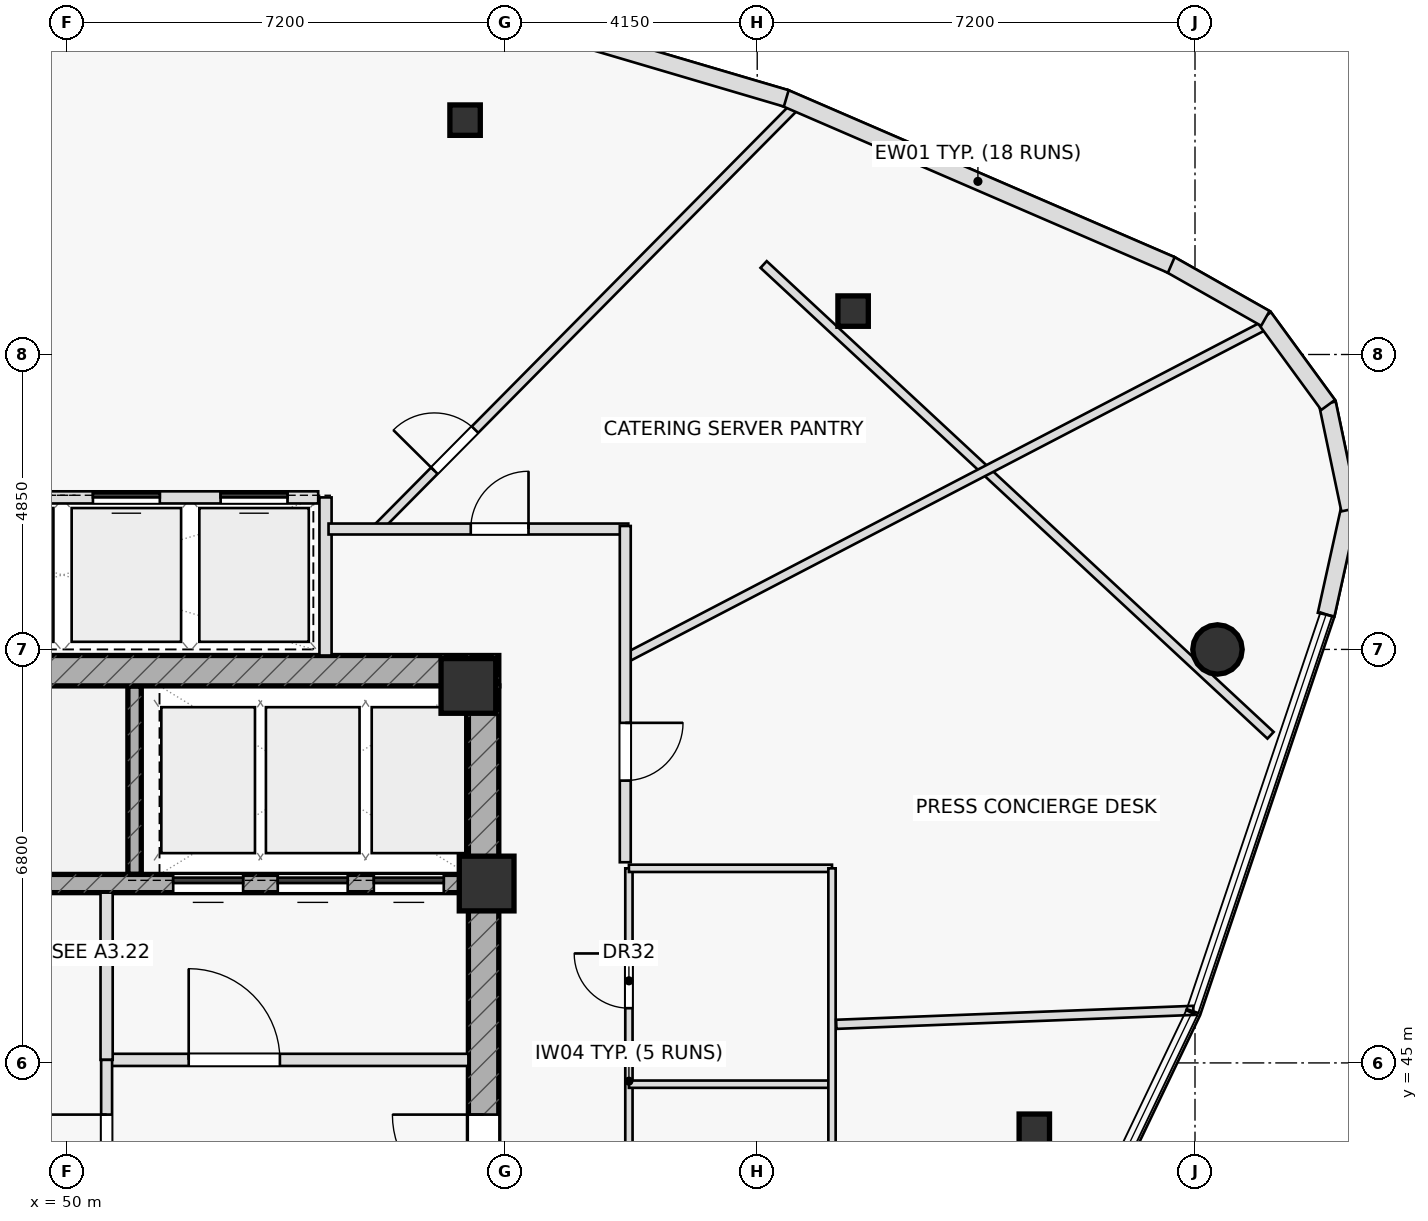
"""IFC4 building model, lengths in metres.
Left out: names, types, materials, properties, quantities, classifications, styles, units other than length and angle.
Written with IfcOpenShell. Run it as: python <this file> out.ifc"""

import sys

from ifc_helpers import new_model, si_unit, direction, frame, frame_2d, origin, origin_2d, place, context, subcontext, project, spatial, rectangle, hollow_rectangle, hollow_circle, extrude, element, fill, save


model = new_model("IFC4")
c1 = context("Model", 3, precision=1e-05, world=origin(), true_north=direction((0.0, 1.0)))
c2 = subcontext(c1, "Body", "Model", "MODEL_VIEW")
j1 = project(units=[si_unit("LENGTHUNIT", "METRE"), si_unit("PLANEANGLEUNIT", "RADIAN")], contexts=[c1])
p1 = place(None, origin())
s1 = spatial("IfcSite", under=j1, at=p1, CompositionType="ELEMENT")
p2 = place(p1, origin())
s2 = spatial("IfcBuilding", under=s1, at=p2, CompositionType="ELEMENT")
p3 = place(p2, frame((0.0, 0.0, 269.55)))
s3 = spatial("IfcBuildingStorey", under=s2, at=p3, CompositionType="ELEMENT", Elevation=269.55)
p4 = place(p3, frame((51.11, 48.1, 0.0), z_axis=(0.0, 0.0, 1.0), x_axis=(0.0, 1.0, 0.0)))
e1 = element("IfcWall", 1, at=p4, inside=s3, PredefinedType="SHEAR", context=c2, shape_type="SweptSolid", body=[
    extrude(rectangle(XDim=3.1, YDim=0.22, at=frame_2d((1.55, 0.0))), origin(), (0.0, 0.0, 1.0), 3.5),
])
p5 = place(p3, frame((42.9, 51.45, 0.0), z_axis=(0.0, 0.0, 1.0), x_axis=(1.0, 0.0, 0.0)))
e2 = element("IfcWall", 2, at=p5, inside=s3, PredefinedType="SHEAR", context=c2, shape_type="SweptSolid", body=[
    extrude(rectangle(XDim=14.2, YDim=0.5, at=frame_2d((7.1, 0.0))), origin(), (0.0, 0.0, 1.0), 3.5),
])
p6 = place(p5, frame((0.78, 0.0, 0.0)))
e3 = element("IfcOpeningElement", 3, at=p6, cuts=e2, PredefinedType="OPENING", context=c2, shape_type="SweptSolid", body=[
    extrude(rectangle(XDim=1.05, YDim=2.2, at=frame_2d((0.525, 1.1))), frame((0.0, 0.26, 0.0), z_axis=(0.0, -1.0, 0.0), x_axis=(1.0, 0.0, 0.0)), (0.0, 0.0, 1.0), 0.52),
])
p7 = place(p3, frame((56.85, 38.8, 0.0), z_axis=(0.0, 0.0, 1.0), x_axis=(0.0, 1.0, 0.0)))
e4 = element("IfcWall", 4, at=p7, inside=s3, PredefinedType="SHEAR", context=c2, shape_type="SweptSolid", body=[
    extrude(rectangle(XDim=12.4, YDim=0.5, at=frame_2d((6.2, 0.0))), origin(), (0.0, 0.0, 1.0), 3.5),
])
p8 = place(p7, frame((3.85, 0.0, 0.0)))
e5 = element("IfcOpeningElement", 5, at=p8, cuts=e4, PredefinedType="OPENING", context=c2, shape_type="SweptSolid", body=[
    extrude(rectangle(XDim=1.5, YDim=2.2, at=frame_2d((0.75, 1.1))), frame((0.0, 0.26, 0.0), z_axis=(0.0, -1.0, 0.0), x_axis=(1.0, 0.0, 0.0)), (0.0, 0.0, 1.0), 0.52),
])
p9 = place(p3, frame((43.4, 47.95, 0.0), z_axis=(0.0, 0.0, 1.0), x_axis=(1.0, 0.0, 0.0)))
e6 = element("IfcWall", 6, at=p9, inside=s3, PredefinedType="SHEAR", context=c2, shape_type="SweptSolid", body=[
    extrude(rectangle(XDim=13.2, YDim=0.3, at=frame_2d((6.6, 0.0))), origin(), (0.0, 0.0, 1.0), 3.5),
])
p10 = place(p9, frame((8.345, 0.0, 0.0)))
e7 = element("IfcOpeningElement", 7, at=p10, cuts=e6, PredefinedType="OPENING", context=c2, shape_type="SweptSolid", body=[
    extrude(rectangle(XDim=1.15, YDim=2.2, at=frame_2d((0.575, 1.1))), frame((0.0, 0.16, 0.0), z_axis=(0.0, -1.0, 0.0), x_axis=(1.0, 0.0, 0.0)), (0.0, 0.0, 1.0), 0.32),
])
p11 = place(p9, frame((10.065, 0.0, 0.0)))
e8 = element("IfcOpeningElement", 8, at=p11, cuts=e6, PredefinedType="OPENING", context=c2, shape_type="SweptSolid", body=[
    extrude(rectangle(XDim=1.15, YDim=2.2, at=frame_2d((0.575, 1.1))), frame((0.0, 0.16, 0.0), z_axis=(0.0, -1.0, 0.0), x_axis=(1.0, 0.0, 0.0)), (0.0, 0.0, 1.0), 0.32),
])
p12 = place(p9, frame((11.645, 0.0, 0.0)))
e9 = element("IfcOpeningElement", 9, at=p12, cuts=e6, PredefinedType="OPENING", context=c2, shape_type="SweptSolid", body=[
    extrude(rectangle(XDim=1.15, YDim=2.2, at=frame_2d((0.575, 1.1))), frame((0.0, 0.16, 0.0), z_axis=(0.0, -1.0, 0.0), x_axis=(1.0, 0.0, 0.0)), (0.0, 0.0, 1.0), 0.32),
])
for number, where, z_axis, x_axis in (
    (10, (56.9, 47.95, 0.0), (0.0, 0.0, 1.0), (1.0, 0.0, 0.0)),
    (11, (56.6, 51.2, 0.0), (0.0, 0.0, 1.0), (1.0, 0.0, 0.0)),
):
    element("IfcColumn", number, at=place(p3, frame(where, z_axis=z_axis, x_axis=x_axis)), inside=s3, PredefinedType="COLUMN", context=c2, shape_type="SweptSolid", body=[
        extrude(rectangle(XDim=0.9, YDim=0.9, at=origin_2d()), origin(), (0.0, 0.0, 1.0), 3.5),
    ])
p13 = place(p3, frame((65.907, 43.909, 0.0), z_axis=(0.0, 0.0, 1.0), x_axis=(1.0, 0.0, 0.0)))
e12 = element("IfcColumn", 12, at=p13, inside=s3, PredefinedType="COLUMN", context=c2, shape_type="SweptSolid", body=[
    extrude(hollow_rectangle(XDim=0.5, YDim=0.5, WallThickness=0.03, at=origin_2d()), origin(), (0.0, 0.0, 1.0), 3.5),
])
p14 = place(p3, frame((68.92, 51.799, 0.0), z_axis=(0.0, 0.0, 1.0), x_axis=(1.0, 0.0, 0.0)))
e13 = element("IfcColumn", 13, at=p14, inside=s3, PredefinedType="COLUMN", context=c2, shape_type="SweptSolid", body=[
    extrude(hollow_circle(Radius=0.406, WallThickness=0.036, at=origin_2d()), origin(), (0.0, 0.0, 1.0), 3.5),
])
for number, where, z_axis, x_axis in (
    (14, (62.927, 57.364, 0.0), (0.0, 0.0, 1.0), (1.0, 0.0, 0.0)),
    (15, (56.546, 60.504, 0.0), (0.0, 0.0, 1.0), (1.0, 0.0, 0.0)),
):
    element("IfcColumn", number, at=place(p3, frame(where, z_axis=z_axis, x_axis=x_axis)), inside=s3, PredefinedType="COLUMN", context=c2, shape_type="SweptSolid", body=[
        extrude(hollow_rectangle(XDim=0.5, YDim=0.5, WallThickness=0.03, at=origin_2d()), origin(), (0.0, 0.0, 1.0), 3.5),
    ])
p15 = place(p3, frame((54.25, 51.7, 0.0), z_axis=(0.0, 0.0, 1.0), x_axis=(0.0, 1.0, 0.0)))
e16 = element("IfcWall", 16, at=p15, inside=s3, PredefinedType="PARTITIONING", context=c2, shape_type="SweptSolid", body=[
    extrude(rectangle(XDim=2.6, YDim=0.2, at=frame_2d((1.3, 0.0))), origin(), (0.0, 0.0, 1.0), 3.5),
])
p16 = place(p3, frame((50.65, 45.05, 0.0), z_axis=(0.0, 0.0, 1.0), x_axis=(1.0, 0.0, 0.0)))
e17 = element("IfcWall", 17, at=p16, inside=s3, PredefinedType="PARTITIONING", context=c2, shape_type="SweptSolid", body=[
    extrude(rectangle(XDim=5.95, YDim=0.2, at=frame_2d((2.975, 0.0))), origin(), (0.0, 0.0, 1.0), 3.5),
])
p17 = place(p16, frame((1.35, 0.0, 0.0)))
e18 = element("IfcOpeningElement", 18, at=p17, cuts=e17, PredefinedType="OPENING", context=c2, shape_type="SweptSolid", body=[
    extrude(rectangle(XDim=1.5, YDim=2.2, at=frame_2d((0.75, 1.1))), frame((0.0, 0.11, 0.0), z_axis=(0.0, -1.0, 0.0), x_axis=(1.0, 0.0, 0.0)), (0.0, 0.0, 1.0), 0.22),
])
p18 = place(p3, frame((50.65, 45.05, 0.0), z_axis=(0.0, 0.0, 1.0), x_axis=(0.0, 1.0, 0.0)))
e19 = element("IfcWall", 19, at=p18, inside=s3, PredefinedType="PARTITIONING", context=c2, shape_type="SweptSolid", body=[
    extrude(rectangle(XDim=2.75, YDim=0.2, at=frame_2d((1.375, 0.0))), origin(), (0.0, 0.0, 1.0), 3.5),
])
p19 = place(p3, frame((50.65, 42.2, 0.0), z_axis=(0.0, 0.0, 1.0), x_axis=(0.0, 1.0, 0.0)))
e20 = element("IfcWall", 20, at=p19, inside=s3, PredefinedType="PARTITIONING", context=c2, shape_type="SweptSolid", body=[
    extrude(rectangle(XDim=2.85, YDim=0.18, at=frame_2d((1.425, 0.0))), origin(), (0.0, 0.0, 1.0), 3.5),
])
p20 = place(p19, frame((0.45, 0.0, 0.0)))
e21 = element("IfcOpeningElement", 21, at=p20, cuts=e20, PredefinedType="OPENING", context=c2, shape_type="SweptSolid", body=[
    extrude(rectangle(XDim=1.5, YDim=2.2, at=frame_2d((0.75, 1.1))), frame((0.0, 0.1, 0.0), z_axis=(0.0, -1.0, 0.0), x_axis=(1.0, 0.0, 0.0)), (0.0, 0.0, 1.0), 0.2),
])
p21 = place(p3, frame((69.792, 50.388, 0.0), z_axis=(0.0, 0.0, 1.0), x_axis=(-0.732769799181, 0.680476613418, 0.0)))
e22 = element("IfcWall", 22, at=p21, inside=s3, PredefinedType="PARTITIONING", context=c2, shape_type="SweptSolid", body=[
    extrude(rectangle(XDim=11.378, YDim=0.15, at=frame_2d((5.689, 0.0))), origin(), (0.0, 0.0, 1.0), 2.195),
])
p22 = place(p3, frame((59.24, 41.2, 0.0), z_axis=(0.0, 0.0, 1.0), x_axis=(0.0, 1.0, 0.0)))
e23 = element("IfcWall", 23, at=p22, inside=s3, PredefinedType="PARTITIONING", context=c2, shape_type="SweptSolid", body=[
    extrude(rectangle(XDim=7.0, YDim=0.12, at=frame_2d((3.5, 0.0))), origin(), (0.0, 0.0, 1.0), 3.5),
])
p23 = place(p22, frame((1.15, 0.0, 0.0)))
e24 = element("IfcOpeningElement", 24, at=p23, cuts=e23, PredefinedType="OPENING", context=c2, shape_type="SweptSolid", body=[
    extrude(rectangle(XDim=0.9, YDim=2.05, at=frame_2d((0.45, 1.025))), frame((0.0, 0.07, 0.0), z_axis=(0.0, -1.0, 0.0), x_axis=(1.0, 0.0, 0.0)), (0.0, 0.0, 1.0), 0.14),
])
p24 = place(p22, frame((4.7, 0.0, 0.0)))
e25 = element("IfcOpeningElement", 25, at=p24, cuts=e23, PredefinedType="OPENING", context=c2, shape_type="SweptSolid", body=[
    extrude(rectangle(XDim=0.9, YDim=2.05, at=frame_2d((0.45, 1.025))), frame((0.0, 0.07, 0.0), z_axis=(0.0, -1.0, 0.0), x_axis=(1.0, 0.0, 0.0)), (0.0, 0.0, 1.0), 0.14),
])
for number, where, z_axis, x_axis in (
    (26, (59.24, 44.65, 0.0), (0.0, 0.0, 1.0), (1.0, 0.0, 0.0)),
    (27, (59.24, 48.2, 0.0), (0.0, 0.0, 1.0), (1.0, 0.0, 0.0)),
):
    element("IfcWall", number, at=place(p3, frame(where, z_axis=z_axis, x_axis=x_axis)), inside=s3, PredefinedType="PARTITIONING", context=c2, shape_type="SweptSolid", body=[
        extrude(rectangle(XDim=3.34, YDim=0.12, at=frame_2d((1.67, 0.0))), origin(), (0.0, 0.0, 1.0), 3.5),
    ])
p25 = place(p3, frame((62.58, 41.2, 0.0), z_axis=(0.0, 0.0, 1.0), x_axis=(0.0, 1.0, 0.0)))
e28 = element("IfcWall", 28, at=p25, inside=s3, PredefinedType="PARTITIONING", context=c2, shape_type="SweptSolid", body=[
    extrude(rectangle(XDim=7.0, YDim=0.12, at=frame_2d((3.5, 0.0))), origin(), (0.0, 0.0, 1.0), 2.195),
])
p26 = place(p3, frame((62.65, 45.635, 0.0), z_axis=(0.0, 0.0, 1.0), x_axis=(0.999237552825, 0.039042451561, 0.0)))
e29 = element("IfcWall", 29, at=p26, inside=s3, PredefinedType="PARTITIONING", context=c2, shape_type="SweptSolid", body=[
    extrude(rectangle(XDim=5.878, YDim=0.15, at=frame_2d((2.939, 0.0))), origin(), (0.0, 0.0, 1.0), 2.195),
])
p27 = place(p3, frame((59.18, 51.654, 0.0), z_axis=(0.0, 0.0, 1.0), x_axis=(0.886985643628, 0.461796998689, 0.0)))
e30 = element("IfcWall", 30, at=p27, inside=s3, PredefinedType="PARTITIONING", context=c2, shape_type="SweptSolid", body=[
    extrude(rectangle(XDim=11.938, YDim=0.15, at=frame_2d((5.969, 0.0))), origin(), (0.0, 0.0, 1.0), 2.195),
])
p28 = place(p3, frame((55.091, 53.78, 0.0), z_axis=(0.0, 0.0, 1.0), x_axis=(0.703481300476, 0.710713767899, 0.0)))
e31 = element("IfcWall", 31, at=p28, inside=s3, PredefinedType="PARTITIONING", context=c2, shape_type="SweptSolid", body=[
    extrude(rectangle(XDim=9.857, YDim=0.15, at=frame_2d((4.928, 0.0))), origin(), (0.0, 0.0, 1.0), 2.195),
])
p29 = place(p28, frame((1.35, 0.0, 0.0)))
e32 = element("IfcOpeningElement", 32, at=p29, cuts=e31, PredefinedType="OPENING", context=c2, shape_type="SweptSolid", body=[
    extrude(rectangle(XDim=0.95, YDim=2.05, at=frame_2d((0.475, 1.025))), frame((0.0, 0.085, 0.0), z_axis=(0.0, -1.0, 0.0), x_axis=(1.0, 0.0, 0.0)), (0.0, 0.0, 1.0), 0.17),
])
p30 = place(p3, frame((54.3, 53.78, 0.0), z_axis=(0.0, 0.0, 1.0), x_axis=(1.0, 0.0, 0.0)))
e33 = element("IfcWall", 33, at=p30, inside=s3, PredefinedType="PARTITIONING", context=c2, shape_type="SweptSolid", body=[
    extrude(rectangle(XDim=4.93, YDim=0.18, at=frame_2d((2.465, 0.0))), origin(), (0.0, 0.0, 1.0), 2.195),
])
p31 = place(p30, frame((2.339, 0.0, 0.0)))
e34 = element("IfcOpeningElement", 34, at=p31, cuts=e33, PredefinedType="OPENING", context=c2, shape_type="SweptSolid", body=[
    extrude(rectangle(XDim=0.95, YDim=2.05, at=frame_2d((0.475, 1.025))), frame((0.0, 0.1, 0.0), z_axis=(0.0, -1.0, 0.0), x_axis=(1.0, 0.0, 0.0)), (0.0, 0.0, 1.0), 0.2),
])
p32 = place(p3, frame((59.18, 53.83, 0.0), z_axis=(0.0, 0.0, 1.0), x_axis=(0.0, -1.0, 0.0)))
e35 = element("IfcWall", 35, at=p32, inside=s3, PredefinedType="PARTITIONING", context=c2, shape_type="SweptSolid", body=[
    extrude(rectangle(XDim=5.53, YDim=0.18, at=frame_2d((2.765, 0.0))), origin(), (0.0, 0.0, 1.0), 2.195),
])
p33 = place(p32, frame((3.238, 0.0, 0.0)))
e36 = element("IfcOpeningElement", 36, at=p33, cuts=e35, PredefinedType="OPENING", context=c2, shape_type="SweptSolid", body=[
    extrude(rectangle(XDim=0.95, YDim=2.05, at=frame_2d((0.475, 1.025))), frame((0.0, 0.1, 0.0), z_axis=(0.0, -1.0, 0.0), x_axis=(1.0, 0.0, 0.0)), (0.0, 0.0, 1.0), 0.2),
])
p34 = place(p3, frame((70.707, 52.372, 0.0), z_axis=(0.0, 0.0, 1.0), x_axis=(0.215478201937, 0.976508650494, 0.0)))
e37 = element("IfcWall", 37, at=p34, inside=s3, PredefinedType="STANDARD", context=c2, shape_type="SweptSolid", body=[
    extrude(rectangle(XDim=1.798, YDim=0.28, at=frame_2d((0.899, 0.0))), origin(), (0.0, 0.0, 1.0), 3.5),
])
p35 = place(p3, frame((71.094, 54.099, 0.0), z_axis=(0.0, 0.0, 1.0), x_axis=(-0.20541120813, 0.978675756098, 0.0)))
e38 = element("IfcWall", 38, at=p35, inside=s3, PredefinedType="STANDARD", context=c2, shape_type="SweptSolid", body=[
    extrude(rectangle(XDim=1.786, YDim=0.28, at=frame_2d((0.893, 0.0))), origin(), (0.0, 0.0, 1.0), 3.5),
])
p36 = place(p3, frame((70.739, 55.82, 0.0), z_axis=(0.0, 0.0, 1.0), x_axis=(-0.589852141092, 0.807511270292, 0.0)))
e39 = element("IfcWall", 39, at=p36, inside=s3, PredefinedType="STANDARD", context=c2, shape_type="SweptSolid", body=[
    extrude(rectangle(XDim=1.787, YDim=0.28, at=frame_2d((0.894, 0.0))), origin(), (0.0, 0.0, 1.0), 3.5),
])
p37 = place(p3, frame((69.707, 57.244, 0.0), z_axis=(0.0, 0.0, 1.0), x_axis=(-0.86998166577, 0.493084071153, 0.0)))
e40 = element("IfcWall", 40, at=p37, inside=s3, PredefinedType="STANDARD", context=c2, shape_type="SweptSolid", body=[
    extrude(rectangle(XDim=1.809, YDim=0.28, at=frame_2d((0.905, 0.0))), origin(), (0.0, 0.0, 1.0), 3.5),
])
p38 = place(p3, frame((68.16, 58.122, 0.0), z_axis=(0.0, 0.0, 1.0), x_axis=(-0.917910450848, 0.396787605936, 0.0)))
e41 = element("IfcWall", 41, at=p38, inside=s3, PredefinedType="STANDARD", context=c2, shape_type="SweptSolid", body=[
    extrude(rectangle(XDim=6.929, YDim=0.28, at=frame_2d((3.465, 0.0))), origin(), (0.0, 0.0, 1.0), 3.5),
])
p39 = place(p3, frame((61.828, 60.862, 0.0), z_axis=(0.0, 0.0, 1.0), x_axis=(-0.959198421643, 0.282733775693, 0.0)))
e42 = element("IfcWall", 42, at=p39, inside=s3, PredefinedType="STANDARD", context=c2, shape_type="SweptSolid", body=[
    extrude(rectangle(XDim=6.917, YDim=0.28, at=frame_2d((3.459, 0.0))), origin(), (0.0, 0.0, 1.0), 3.5),
])
p40 = place(p3, frame((45.82, 54.3, 0.0), z_axis=(0.0, 0.0, 1.0), x_axis=(1.0, 0.0, 0.0)))
e43 = element("IfcWall", 43, at=p40, inside=s3, PredefinedType="PARTITIONING", context=c2, shape_type="SweptSolid", body=[
    extrude(rectangle(XDim=8.31, YDim=0.2, at=frame_2d((4.155, 0.0))), origin(), (0.0, 0.0, 1.0), 3.5),
])
p41 = place(p40, frame((0.405, 0.0, 0.0)))
e44 = element("IfcOpeningElement", 44, at=p41, cuts=e43, PredefinedType="OPENING", context=c2, shape_type="SweptSolid", body=[
    extrude(rectangle(XDim=1.1, YDim=2.15, at=frame_2d((0.55, 1.075))), frame((0.0, 0.11, 0.0), z_axis=(0.0, -1.0, 0.0), x_axis=(1.0, 0.0, 0.0)), (0.0, 0.0, 1.0), 0.22),
])
p42 = place(p40, frame((2.505, 0.0, 0.0)))
e45 = element("IfcOpeningElement", 45, at=p42, cuts=e43, PredefinedType="OPENING", context=c2, shape_type="SweptSolid", body=[
    extrude(rectangle(XDim=1.1, YDim=2.15, at=frame_2d((0.55, 1.075))), frame((0.0, 0.11, 0.0), z_axis=(0.0, -1.0, 0.0), x_axis=(1.0, 0.0, 0.0)), (0.0, 0.0, 1.0), 0.22),
])
p43 = place(p40, frame((4.605, 0.0, 0.0)))
e46 = element("IfcOpeningElement", 46, at=p43, cuts=e43, PredefinedType="OPENING", context=c2, shape_type="SweptSolid", body=[
    extrude(rectangle(XDim=1.1, YDim=2.15, at=frame_2d((0.55, 1.075))), frame((0.0, 0.11, 0.0), z_axis=(0.0, -1.0, 0.0), x_axis=(1.0, 0.0, 0.0)), (0.0, 0.0, 1.0), 0.22),
])
p44 = place(p40, frame((6.705, 0.0, 0.0)))
e47 = element("IfcOpeningElement", 47, at=p44, cuts=e43, PredefinedType="OPENING", context=c2, shape_type="SweptSolid", body=[
    extrude(rectangle(XDim=1.1, YDim=2.15, at=frame_2d((0.55, 1.075))), frame((0.0, 0.11, 0.0), z_axis=(0.0, -1.0, 0.0), x_axis=(1.0, 0.0, 0.0)), (0.0, 0.0, 1.0), 0.22),
])
p45 = place(p8, origin())
e48 = element("IfcDoor", 48, at=p45, inside=s3, OperationType="SINGLE_SWING_RIGHT", PredefinedType="DOOR", context=c2, shape_type="SweptSolid", body=[
    extrude(rectangle(XDim=1.5, YDim=2.2, at=frame_2d((0.75, 1.1))), frame((0.0, 0.025, 0.0), z_axis=(0.0, -1.0, 0.0), x_axis=(1.0, 0.0, 0.0)), (0.0, 0.0, 1.0), 0.05),
])
fill(e5, e48)
p46 = place(p17, origin())
e49 = element("IfcDoor", 49, at=p46, inside=s3, OperationType="SINGLE_SWING_LEFT", PredefinedType="DOOR", context=c2, shape_type="SweptSolid", body=[
    extrude(rectangle(XDim=1.5, YDim=2.2, at=frame_2d((0.75, 1.1))), frame((0.0, 0.025, 0.0), z_axis=(0.0, -1.0, 0.0), x_axis=(1.0, 0.0, 0.0)), (0.0, 0.0, 1.0), 0.05),
])
fill(e18, e49)
p47 = place(p20, origin())
e50 = element("IfcDoor", 50, at=p47, inside=s3, OperationType="SINGLE_SWING_RIGHT", PredefinedType="DOOR", context=c2, shape_type="SweptSolid", body=[
    extrude(rectangle(XDim=1.5, YDim=2.2, at=frame_2d((0.75, 1.1))), frame((0.0, 0.025, 0.0), z_axis=(0.0, -1.0, 0.0), x_axis=(1.0, 0.0, 0.0)), (0.0, 0.0, 1.0), 0.05),
])
fill(e21, e50)
p48 = place(p24, origin())
e51 = element("IfcDoor", 51, at=p48, inside=s3, OperationType="SINGLE_SWING_RIGHT", PredefinedType="DOOR", context=c2, shape_type="SweptSolid", body=[
    extrude(rectangle(XDim=0.9, YDim=2.05, at=frame_2d((0.45, 1.025))), frame((0.0, 0.025, 0.0), z_axis=(0.0, -1.0, 0.0), x_axis=(1.0, 0.0, 0.0)), (0.0, 0.0, 1.0), 0.05),
])
fill(e25, e51)
p49 = place(p29, origin())
e52 = element("IfcDoor", 52, at=p49, inside=s3, OperationType="SINGLE_SWING_LEFT", PredefinedType="DOOR", context=c2, shape_type="SweptSolid", body=[
    extrude(rectangle(XDim=0.95, YDim=2.05, at=frame_2d((0.475, 1.025))), frame((0.0, 0.025, 0.0), z_axis=(0.0, -1.0, 0.0), x_axis=(1.0, 0.0, 0.0)), (0.0, 0.0, 1.0), 0.05),
])
fill(e32, e52)
p50 = place(p31, origin())
e53 = element("IfcDoor", 53, at=p50, inside=s3, OperationType="SINGLE_SWING_RIGHT", PredefinedType="DOOR", context=c2, shape_type="SweptSolid", body=[
    extrude(rectangle(XDim=0.95, YDim=2.05, at=frame_2d((0.475, 1.025))), frame((0.0, 0.025, 0.0), z_axis=(0.0, -1.0, 0.0), x_axis=(1.0, 0.0, 0.0)), (0.0, 0.0, 1.0), 0.05),
])
fill(e34, e53)
p51 = place(p33, origin())
e54 = element("IfcDoor", 54, at=p51, inside=s3, OperationType="SINGLE_SWING_LEFT", PredefinedType="DOOR", context=c2, shape_type="SweptSolid", body=[
    extrude(rectangle(XDim=0.95, YDim=2.05, at=frame_2d((0.475, 1.025))), frame((0.0, 0.025, 0.0), z_axis=(0.0, -1.0, 0.0), x_axis=(1.0, 0.0, 0.0)), (0.0, 0.0, 1.0), 0.05),
])
fill(e36, e54)
p52 = place(p10, origin())
e55 = element("IfcDoor", 55, at=p52, inside=s3, OperationType="SLIDING_TO_LEFT", PredefinedType="DOOR", context=c2, shape_type="SweptSolid", body=[
    extrude(rectangle(XDim=1.15, YDim=2.2, at=frame_2d((0.575, 1.1))), frame((0.0, 0.025, 0.0), z_axis=(0.0, -1.0, 0.0), x_axis=(1.0, 0.0, 0.0)), (0.0, 0.0, 1.0), 0.05),
])
fill(e7, e55)
p53 = place(p11, origin())
e56 = element("IfcDoor", 56, at=p53, inside=s3, OperationType="SLIDING_TO_LEFT", PredefinedType="DOOR", context=c2, shape_type="SweptSolid", body=[
    extrude(rectangle(XDim=1.15, YDim=2.2, at=frame_2d((0.575, 1.1))), frame((0.0, 0.025, 0.0), z_axis=(0.0, -1.0, 0.0), x_axis=(1.0, 0.0, 0.0)), (0.0, 0.0, 1.0), 0.05),
])
fill(e8, e56)
p54 = place(p12, origin())
e57 = element("IfcDoor", 57, at=p54, inside=s3, OperationType="SLIDING_TO_LEFT", PredefinedType="DOOR", context=c2, shape_type="SweptSolid", body=[
    extrude(rectangle(XDim=1.15, YDim=2.2, at=frame_2d((0.575, 1.1))), frame((0.0, 0.025, 0.0), z_axis=(0.0, -1.0, 0.0), x_axis=(1.0, 0.0, 0.0)), (0.0, 0.0, 1.0), 0.05),
])
fill(e9, e57)
p55 = place(p43, origin())
e58 = element("IfcDoor", 58, at=p55, inside=s3, OperationType="SLIDING_TO_LEFT", PredefinedType="DOOR", context=c2, shape_type="SweptSolid", body=[
    extrude(rectangle(XDim=1.1, YDim=2.15, at=frame_2d((0.55, 1.075))), frame((0.0, 0.025, 0.0), z_axis=(0.0, -1.0, 0.0), x_axis=(1.0, 0.0, 0.0)), (0.0, 0.0, 1.0), 0.05),
])
fill(e46, e58)
p56 = place(p44, origin())
e59 = element("IfcDoor", 59, at=p56, inside=s3, OperationType="SLIDING_TO_RIGHT", PredefinedType="DOOR", context=c2, shape_type="SweptSolid", body=[
    extrude(rectangle(XDim=1.1, YDim=2.15, at=frame_2d((0.55, 1.075))), frame((0.0, 0.025, 0.0), z_axis=(0.0, -1.0, 0.0), x_axis=(1.0, 0.0, 0.0)), (0.0, 0.0, 1.0), 0.05),
])
fill(e47, e59)
save(model, sys.argv[1])
